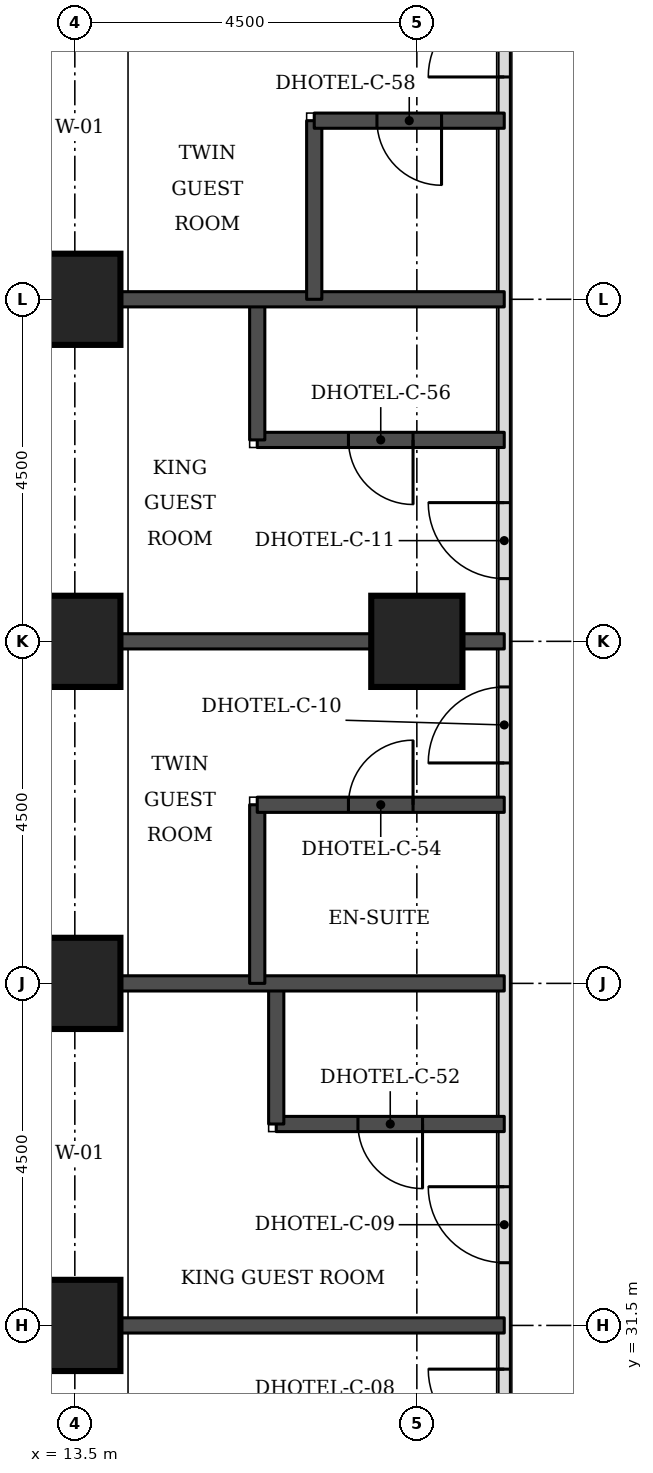
"""IFC4 building model, lengths in metres.
Left out: names, types, materials, properties, quantities, classifications, styles, units other than length and angle.
Written with IfcOpenShell. Run it as: python <this file> out.ifc"""

import sys

from ifc_helpers import new_model, si_unit, direction, frame, frame_2d, origin, origin_2d, place, context, subcontext, project, spatial, rectangle, extrude, element, fill, save


model = new_model("IFC4")
c1 = context("Model", 3, precision=1e-05, world=origin(), true_north=direction((0.0, 1.0)))
c2 = subcontext(c1, "Body", "Model", "MODEL_VIEW")
j1 = project(units=[si_unit("LENGTHUNIT", "METRE"), si_unit("PLANEANGLEUNIT", "RADIAN")], contexts=[c1])
p1 = place(None, origin())
s1 = spatial("IfcSite", under=j1, at=p1, CompositionType="ELEMENT")
p2 = place(p1, origin())
s2 = spatial("IfcBuilding", under=s1, at=p2, CompositionType="ELEMENT")
p3 = place(p2, frame((0.0, 0.0, 56.1)))
s3 = spatial("IfcBuildingStorey", under=s2, at=p3, CompositionType="ELEMENT", Elevation=56.1)
for number, where, z_axis, x_axis in (
    (1, (13.5, 31.5, 0.0), (0.0, 0.0, 1.0), (1.0, 0.0, 0.0)),
    (2, (13.5, 36.0, 0.0), (0.0, 0.0, 1.0), (1.0, 0.0, 0.0)),
    (3, (13.5, 40.5, 0.0), (0.0, 0.0, 1.0), (1.0, 0.0, 0.0)),
    (4, (18.0, 40.5, 0.0), (0.0, 0.0, 1.0), (1.0, 0.0, 0.0)),
    (5, (13.5, 45.0, 0.0), (0.0, 0.0, 1.0), (1.0, 0.0, 0.0)),
):
    element("IfcColumn", number, at=place(p3, frame(where, z_axis=z_axis, x_axis=x_axis)), inside=s3, PredefinedType="COLUMN", context=c2, shape_type="SweptSolid", body=[
        extrude(rectangle(XDim=1.2, YDim=1.2, at=origin_2d()), origin(), (0.0, 0.0, 1.0), 3.3),
    ])
p4 = place(p3, frame((19.15, 25.15, 0.0), z_axis=(0.0, 0.0, 1.0), x_axis=(0.0, 1.0, 0.0)))
e6 = element("IfcWall", 6, at=p4, inside=s3, PredefinedType="PARTITIONING", context=c2, shape_type="SweptSolid", body=[
    extrude(rectangle(XDim=24.35, YDim=0.15, at=frame_2d((12.175, 0.0))), origin(), (0.0, 0.0, 1.0), 3.08),
])
p5 = place(p4, frame((0.347, 0.0, 0.0)))
e7 = element("IfcOpeningElement", 7, at=p5, cuts=e6, PredefinedType="OPENING", context=c2, shape_type="SweptSolid", body=[
    extrude(rectangle(XDim=1.0, YDim=2.1, at=frame_2d((0.5, 1.05))), frame((0.0, 0.085, 0.0), z_axis=(0.0, -1.0, 0.0), x_axis=(1.0, 0.0, 0.0)), (0.0, 0.0, 1.0), 0.17),
])
p6 = place(p4, frame((4.775, 0.0, 0.0)))
e8 = element("IfcOpeningElement", 8, at=p6, cuts=e6, PredefinedType="OPENING", context=c2, shape_type="SweptSolid", body=[
    extrude(rectangle(XDim=1.0, YDim=2.1, at=frame_2d((0.5, 1.05))), frame((0.0, 0.085, 0.0), z_axis=(0.0, -1.0, 0.0), x_axis=(1.0, 0.0, 0.0)), (0.0, 0.0, 1.0), 0.17),
])
p7 = place(p4, frame((7.175, 0.0, 0.0)))
e9 = element("IfcOpeningElement", 9, at=p7, cuts=e6, PredefinedType="OPENING", context=c2, shape_type="SweptSolid", body=[
    extrude(rectangle(XDim=1.0, YDim=2.1, at=frame_2d((0.5, 1.05))), frame((0.0, 0.085, 0.0), z_axis=(0.0, -1.0, 0.0), x_axis=(1.0, 0.0, 0.0)), (0.0, 0.0, 1.0), 0.17),
])
p8 = place(p4, frame((13.75, 0.0, 0.0)))
e10 = element("IfcOpeningElement", 10, at=p8, cuts=e6, PredefinedType="OPENING", context=c2, shape_type="SweptSolid", body=[
    extrude(rectangle(XDim=1.0, YDim=2.1, at=frame_2d((0.5, 1.05))), frame((0.0, 0.085, 0.0), z_axis=(0.0, -1.0, 0.0), x_axis=(1.0, 0.0, 0.0)), (0.0, 0.0, 1.0), 0.17),
])
p9 = place(p4, frame((16.175, 0.0, 0.0)))
e11 = element("IfcOpeningElement", 11, at=p9, cuts=e6, PredefinedType="OPENING", context=c2, shape_type="SweptSolid", body=[
    extrude(rectangle(XDim=1.0, YDim=2.1, at=frame_2d((0.5, 1.05))), frame((0.0, 0.085, 0.0), z_axis=(0.0, -1.0, 0.0), x_axis=(1.0, 0.0, 0.0)), (0.0, 0.0, 1.0), 0.17),
])
p10 = place(p4, frame((22.775, 0.0, 0.0)))
e12 = element("IfcOpeningElement", 12, at=p10, cuts=e6, PredefinedType="OPENING", context=c2, shape_type="SweptSolid", body=[
    extrude(rectangle(XDim=1.0, YDim=2.1, at=frame_2d((0.5, 1.05))), frame((0.0, 0.085, 0.0), z_axis=(0.0, -1.0, 0.0), x_axis=(1.0, 0.0, 0.0)), (0.0, 0.0, 1.0), 0.17),
])
p11 = place(p3, frame((14.1, 31.5, 0.0), z_axis=(0.0, 0.0, 1.0), x_axis=(1.0, 0.0, 0.0)))
e13 = element("IfcWall", 13, at=p11, inside=s3, PredefinedType="SOLIDWALL", context=c2, shape_type="SweptSolid", body=[
    extrude(rectangle(XDim=5.05, YDim=0.2, at=frame_2d((2.525, 0.0))), origin(), (0.0, 0.0, 1.0), 3.08),
])
p12 = place(p3, frame((16.15, 34.15, 0.0), z_axis=(0.0, 0.0, 1.0), x_axis=(1.0, 0.0, 0.0)))
e14 = element("IfcWall", 14, at=p12, inside=s3, PredefinedType="SOLIDWALL", context=c2, shape_type="SweptSolid", body=[
    extrude(rectangle(XDim=3.0, YDim=0.2, at=frame_2d((1.5, 0.0))), origin(), (0.0, 0.0, 1.0), 3.08),
])
p13 = place(p12, frame((1.075, 0.0, 0.0)))
e15 = element("IfcOpeningElement", 15, at=p13, cuts=e14, PredefinedType="OPENING", context=c2, shape_type="SweptSolid", body=[
    extrude(rectangle(XDim=0.85, YDim=2.1, at=frame_2d((0.425, 1.05))), frame((0.0, 0.11, 0.0), z_axis=(0.0, -1.0, 0.0), x_axis=(1.0, 0.0, 0.0)), (0.0, 0.0, 1.0), 0.22),
])
p14 = place(p3, frame((16.15, 34.15, 0.0), z_axis=(0.0, 0.0, 1.0), x_axis=(0.0, 1.0, 0.0)))
e16 = element("IfcWall", 16, at=p14, inside=s3, PredefinedType="SOLIDWALL", context=c2, shape_type="SweptSolid", body=[
    extrude(rectangle(XDim=1.85, YDim=0.2, at=frame_2d((0.925, 0.0))), origin(), (0.0, 0.0, 1.0), 3.08),
])
p15 = place(p3, frame((14.1, 36.0, 0.0), z_axis=(0.0, 0.0, 1.0), x_axis=(1.0, 0.0, 0.0)))
e17 = element("IfcWall", 17, at=p15, inside=s3, PredefinedType="SOLIDWALL", context=c2, shape_type="SweptSolid", body=[
    extrude(rectangle(XDim=5.05, YDim=0.2, at=frame_2d((2.525, 0.0))), origin(), (0.0, 0.0, 1.0), 3.08),
])
p16 = place(p3, frame((15.9, 36.0, 0.0), z_axis=(0.0, 0.0, 1.0), x_axis=(0.0, 1.0, 0.0)))
e18 = element("IfcWall", 18, at=p16, inside=s3, PredefinedType="SOLIDWALL", context=c2, shape_type="SweptSolid", body=[
    extrude(rectangle(XDim=2.35, YDim=0.2, at=frame_2d((1.175, 0.0))), origin(), (0.0, 0.0, 1.0), 3.08),
])
p17 = place(p3, frame((15.9, 38.35, 0.0), z_axis=(0.0, 0.0, 1.0), x_axis=(1.0, 0.0, 0.0)))
e19 = element("IfcWall", 19, at=p17, inside=s3, PredefinedType="SOLIDWALL", context=c2, shape_type="SweptSolid", body=[
    extrude(rectangle(XDim=3.25, YDim=0.2, at=frame_2d((1.625, 0.0))), origin(), (0.0, 0.0, 1.0), 3.08),
])
p18 = place(p17, frame((1.2, 0.0, 0.0)))
e20 = element("IfcOpeningElement", 20, at=p18, cuts=e19, PredefinedType="OPENING", context=c2, shape_type="SweptSolid", body=[
    extrude(rectangle(XDim=0.85, YDim=2.1, at=frame_2d((0.425, 1.05))), frame((0.0, 0.11, 0.0), z_axis=(0.0, -1.0, 0.0), x_axis=(1.0, 0.0, 0.0)), (0.0, 0.0, 1.0), 0.22),
])
p19 = place(p3, frame((14.1, 40.5, 0.0), z_axis=(0.0, 0.0, 1.0), x_axis=(1.0, 0.0, 0.0)))
e21 = element("IfcWall", 21, at=p19, inside=s3, PredefinedType="SOLIDWALL", context=c2, shape_type="SweptSolid", body=[
    extrude(rectangle(XDim=5.05, YDim=0.2, at=frame_2d((2.525, 0.0))), origin(), (0.0, 0.0, 1.0), 3.08),
])
p20 = place(p3, frame((15.9, 43.15, 0.0), z_axis=(0.0, 0.0, 1.0), x_axis=(1.0, 0.0, 0.0)))
e22 = element("IfcWall", 22, at=p20, inside=s3, PredefinedType="SOLIDWALL", context=c2, shape_type="SweptSolid", body=[
    extrude(rectangle(XDim=3.25, YDim=0.2, at=frame_2d((1.625, 0.0))), origin(), (0.0, 0.0, 1.0), 3.08),
])
p21 = place(p20, frame((1.2, 0.0, 0.0)))
e23 = element("IfcOpeningElement", 23, at=p21, cuts=e22, PredefinedType="OPENING", context=c2, shape_type="SweptSolid", body=[
    extrude(rectangle(XDim=0.85, YDim=2.1, at=frame_2d((0.425, 1.05))), frame((0.0, 0.11, 0.0), z_axis=(0.0, -1.0, 0.0), x_axis=(1.0, 0.0, 0.0)), (0.0, 0.0, 1.0), 0.22),
])
p22 = place(p3, frame((15.9, 43.15, 0.0), z_axis=(0.0, 0.0, 1.0), x_axis=(0.0, 1.0, 0.0)))
e24 = element("IfcWall", 24, at=p22, inside=s3, PredefinedType="SOLIDWALL", context=c2, shape_type="SweptSolid", body=[
    extrude(rectangle(XDim=1.85, YDim=0.2, at=frame_2d((0.925, 0.0))), origin(), (0.0, 0.0, 1.0), 3.08),
])
p23 = place(p3, frame((14.1, 45.0, 0.0), z_axis=(0.0, 0.0, 1.0), x_axis=(1.0, 0.0, 0.0)))
e25 = element("IfcWall", 25, at=p23, inside=s3, PredefinedType="SOLIDWALL", context=c2, shape_type="SweptSolid", body=[
    extrude(rectangle(XDim=5.05, YDim=0.2, at=frame_2d((2.525, 0.0))), origin(), (0.0, 0.0, 1.0), 3.08),
])
p24 = place(p3, frame((16.65, 45.0, 0.0), z_axis=(0.0, 0.0, 1.0), x_axis=(0.0, 1.0, 0.0)))
e26 = element("IfcWall", 26, at=p24, inside=s3, PredefinedType="SOLIDWALL", context=c2, shape_type="SweptSolid", body=[
    extrude(rectangle(XDim=2.35, YDim=0.2, at=frame_2d((1.175, 0.0))), origin(), (0.0, 0.0, 1.0), 3.08),
])
p25 = place(p3, frame((16.65, 47.35, 0.0), z_axis=(0.0, 0.0, 1.0), x_axis=(1.0, 0.0, 0.0)))
e27 = element("IfcWall", 27, at=p25, inside=s3, PredefinedType="SOLIDWALL", context=c2, shape_type="SweptSolid", body=[
    extrude(rectangle(XDim=2.5, YDim=0.2, at=frame_2d((1.25, 0.0))), origin(), (0.0, 0.0, 1.0), 3.08),
])
p26 = place(p25, frame((0.825, 0.0, 0.0)))
e28 = element("IfcOpeningElement", 28, at=p26, cuts=e27, PredefinedType="OPENING", context=c2, shape_type="SweptSolid", body=[
    extrude(rectangle(XDim=0.85, YDim=2.1, at=frame_2d((0.425, 1.05))), frame((0.0, 0.11, 0.0), z_axis=(0.0, -1.0, 0.0), x_axis=(1.0, 0.0, 0.0)), (0.0, 0.0, 1.0), 0.22),
])
p27 = place(p6, origin())
e29 = element("IfcDoor", 29, at=p27, inside=s3, OperationType="SINGLE_SWING_RIGHT", PredefinedType="DOOR", context=c2, shape_type="SweptSolid", body=[
    extrude(rectangle(XDim=1.0, YDim=2.1, at=frame_2d((0.5, 1.05))), frame((0.0, 0.025, 0.0), z_axis=(0.0, -1.0, 0.0), x_axis=(1.0, 0.0, 0.0)), (0.0, 0.0, 1.0), 0.05),
])
fill(e8, e29)
p28 = place(p7, origin())
e30 = element("IfcDoor", 30, at=p28, inside=s3, OperationType="SINGLE_SWING_RIGHT", PredefinedType="DOOR", context=c2, shape_type="SweptSolid", body=[
    extrude(rectangle(XDim=1.0, YDim=2.1, at=frame_2d((0.5, 1.05))), frame((0.0, 0.025, 0.0), z_axis=(0.0, -1.0, 0.0), x_axis=(1.0, 0.0, 0.0)), (0.0, 0.0, 1.0), 0.05),
])
fill(e9, e30)
p29 = place(p13, frame((0.85, 0.0, 0.0), z_axis=(0.0, 0.0, 1.0), x_axis=(-1.0, 0.0, 0.0)))
e31 = element("IfcDoor", 31, at=p29, inside=s3, OperationType="SINGLE_SWING_LEFT", PredefinedType="DOOR", context=c2, shape_type="SweptSolid", body=[
    extrude(rectangle(XDim=0.85, YDim=2.1, at=frame_2d((0.425, 1.05))), frame((0.0, 0.025, 0.0), z_axis=(0.0, -1.0, 0.0), x_axis=(1.0, 0.0, 0.0)), (0.0, 0.0, 1.0), 0.05),
])
fill(e15, e31)
p30 = place(p8, origin())
e32 = element("IfcDoor", 32, at=p30, inside=s3, OperationType="SINGLE_SWING_LEFT", PredefinedType="DOOR", context=c2, shape_type="SweptSolid", body=[
    extrude(rectangle(XDim=1.0, YDim=2.1, at=frame_2d((0.5, 1.05))), frame((0.0, 0.025, 0.0), z_axis=(0.0, -1.0, 0.0), x_axis=(1.0, 0.0, 0.0)), (0.0, 0.0, 1.0), 0.05),
])
fill(e10, e32)
p31 = place(p18, origin())
e33 = element("IfcDoor", 33, at=p31, inside=s3, OperationType="SINGLE_SWING_RIGHT", PredefinedType="DOOR", context=c2, shape_type="SweptSolid", body=[
    extrude(rectangle(XDim=0.85, YDim=2.1, at=frame_2d((0.425, 1.05))), frame((0.0, 0.025, 0.0), z_axis=(0.0, -1.0, 0.0), x_axis=(1.0, 0.0, 0.0)), (0.0, 0.0, 1.0), 0.05),
])
fill(e20, e33)
p32 = place(p9, origin())
e34 = element("IfcDoor", 34, at=p32, inside=s3, OperationType="SINGLE_SWING_RIGHT", PredefinedType="DOOR", context=c2, shape_type="SweptSolid", body=[
    extrude(rectangle(XDim=1.0, YDim=2.1, at=frame_2d((0.5, 1.05))), frame((0.0, 0.025, 0.0), z_axis=(0.0, -1.0, 0.0), x_axis=(1.0, 0.0, 0.0)), (0.0, 0.0, 1.0), 0.05),
])
fill(e11, e34)
p33 = place(p21, frame((0.85, 0.0, 0.0), z_axis=(0.0, 0.0, 1.0), x_axis=(-1.0, 0.0, 0.0)))
e35 = element("IfcDoor", 35, at=p33, inside=s3, OperationType="SINGLE_SWING_LEFT", PredefinedType="DOOR", context=c2, shape_type="SweptSolid", body=[
    extrude(rectangle(XDim=0.85, YDim=2.1, at=frame_2d((0.425, 1.05))), frame((0.0, 0.025, 0.0), z_axis=(0.0, -1.0, 0.0), x_axis=(1.0, 0.0, 0.0)), (0.0, 0.0, 1.0), 0.05),
])
fill(e23, e35)
p34 = place(p10, origin())
e36 = element("IfcDoor", 36, at=p34, inside=s3, OperationType="SINGLE_SWING_LEFT", PredefinedType="DOOR", context=c2, shape_type="SweptSolid", body=[
    extrude(rectangle(XDim=1.0, YDim=2.1, at=frame_2d((0.5, 1.05))), frame((0.0, 0.025, 0.0), z_axis=(0.0, -1.0, 0.0), x_axis=(1.0, 0.0, 0.0)), (0.0, 0.0, 1.0), 0.05),
])
fill(e12, e36)
p35 = place(p26, frame((0.85, 0.0, 0.0), z_axis=(0.0, 0.0, 1.0), x_axis=(-1.0, 0.0, 0.0)))
e37 = element("IfcDoor", 37, at=p35, inside=s3, OperationType="SINGLE_SWING_LEFT", PredefinedType="DOOR", context=c2, shape_type="SweptSolid", body=[
    extrude(rectangle(XDim=0.85, YDim=2.1, at=frame_2d((0.425, 1.05))), frame((0.0, 0.025, 0.0), z_axis=(0.0, -1.0, 0.0), x_axis=(1.0, 0.0, 0.0)), (0.0, 0.0, 1.0), 0.05),
])
fill(e28, e37)
save(model, sys.argv[1])
